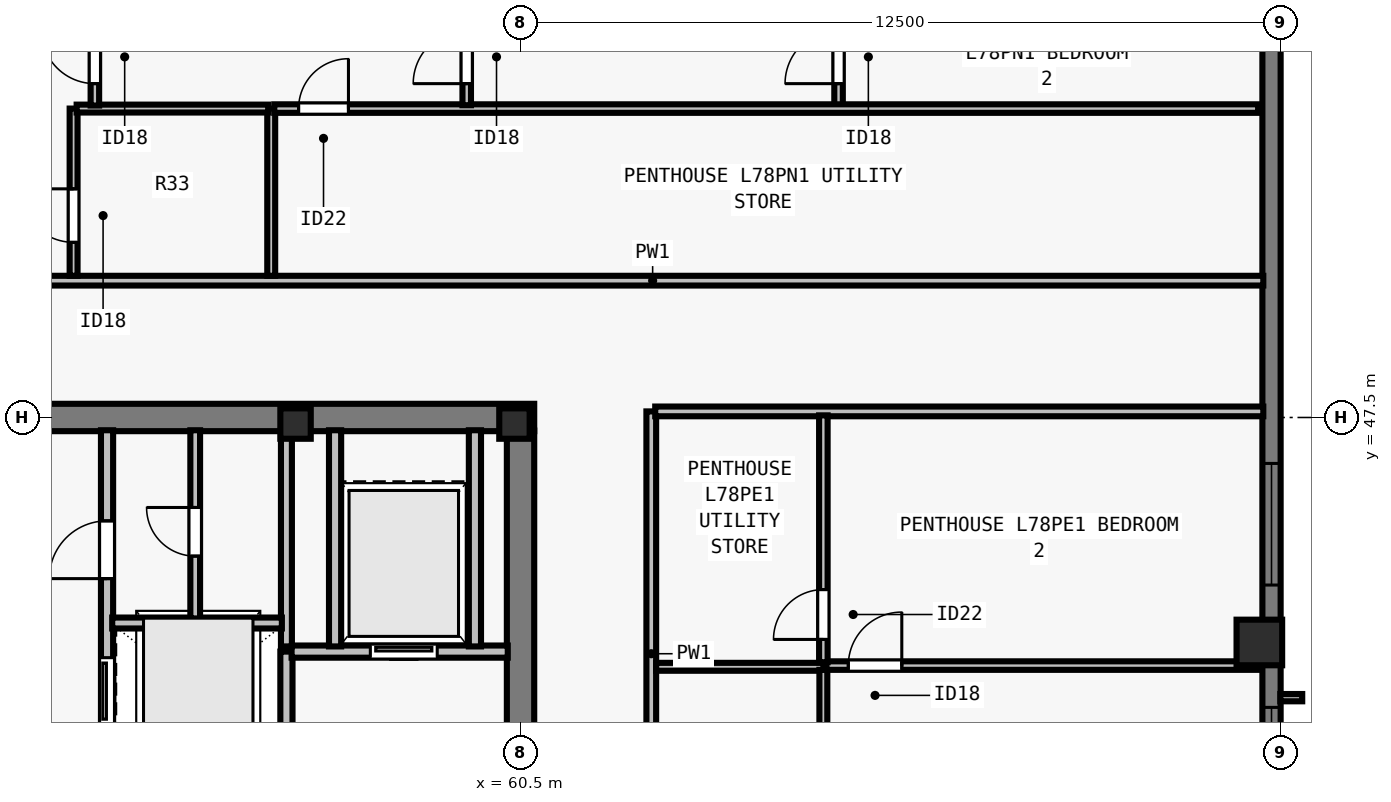
"""IFC4 building model, lengths in metres.
Left out: names, types, materials, properties, quantities, classifications, styles, units other than length and angle.
Written with IfcOpenShell. Run it as: python <this file> out.ifc"""

import sys

from ifc_helpers import new_model, si_unit, direction, frame, frame_2d, origin, origin_2d, place, context, subcontext, project, spatial, rectangle, i_section, extrude, element, fill, save


model = new_model("IFC4")
c1 = context("Model", 3, precision=1e-05, world=origin(), true_north=direction((0.0, 1.0)))
c2 = subcontext(c1, "Body", "Model", "MODEL_VIEW")
j1 = project(units=[si_unit("LENGTHUNIT", "METRE"), si_unit("PLANEANGLEUNIT", "RADIAN")], contexts=[c1])
p1 = place(None, origin())
s1 = spatial("IfcSite", under=j1, at=p1, CompositionType="ELEMENT")
p2 = place(p1, origin())
s2 = spatial("IfcBuilding", under=s1, at=p2, CompositionType="ELEMENT")
p3 = place(p2, frame((0.0, 0.0, 284.0)))
s3 = spatial("IfcBuildingStorey", under=s2, at=p3, CompositionType="ELEMENT", Elevation=284.0)
for number, where, z_axis, x_axis in (
    (1, (56.8, 47.4, 0.0), (0.0, 0.0, 1.0), (1.0, 0.0, 0.0)),
    (2, (60.4, 47.4, 0.0), (0.0, 0.0, 1.0), (1.0, 0.0, 0.0)),
):
    element("IfcColumn", number, at=place(p3, frame(where, z_axis=z_axis, x_axis=x_axis)), inside=s3, PredefinedType="COLUMN", context=c2, shape_type="SweptSolid", body=[
        extrude(i_section(OverallWidth=0.5, OverallDepth=0.5, WebThickness=0.028, FlangeThickness=0.045, at=origin_2d()), origin(), (0.0, 0.0, 1.0), 3.5),
    ])
p4 = place(p3, frame((72.65, 43.8, 0.0), z_axis=(0.0, 0.0, 1.0), x_axis=(0.0, 1.0, 0.0)))
e3 = element("IfcColumn", 3, at=p4, inside=s3, PredefinedType="COLUMN", context=c2, shape_type="SweptSolid", body=[
    extrude(rectangle(XDim=0.75, YDim=0.75, at=origin_2d()), origin(), (0.0, 0.0, 1.0), 3.5),
])
p5 = place(p3, frame((72.85, 54.5, 0.0), z_axis=(0.0, 0.0, 1.0), x_axis=(0.0, -1.0, 0.0)))
e4 = element("IfcWall", 4, at=p5, inside=s3, PredefinedType="SOLIDWALL", context=c2, shape_type="SweptSolid", body=[
    extrude(rectangle(XDim=30.722, YDim=0.3, at=frame_2d((15.361, 0.0))), origin(), (0.0, 0.0, 1.0), 3.29),
])
p6 = place(p5, frame((7.756, 0.0, 0.8)))
e5 = element("IfcOpeningElement", 5, at=p6, cuts=e4, PredefinedType="OPENING", context=c2, shape_type="SweptSolid", body=[
    extrude(rectangle(XDim=2.0, YDim=1.758, at=frame_2d((1.0, 0.879))), frame((0.0, 0.16, 0.0), z_axis=(0.0, -1.0, 0.0), x_axis=(1.0, 0.0, 0.0)), (0.0, 0.0, 1.0), 0.32),
])
p7 = place(p5, frame((11.768, 0.0, 0.8)))
e6 = element("IfcOpeningElement", 6, at=p7, cuts=e4, PredefinedType="OPENING", context=c2, shape_type="SweptSolid", body=[
    extrude(rectangle(XDim=1.65, YDim=1.758, at=frame_2d((0.825, 0.879))), frame((0.0, 0.16, 0.0), z_axis=(0.0, -1.0, 0.0), x_axis=(1.0, 0.0, 0.0)), (0.0, 0.0, 1.0), 0.32),
])
p8 = place(p5, frame((16.28, 0.0, 0.8)))
e7 = element("IfcOpeningElement", 7, at=p8, cuts=e4, PredefinedType="OPENING", context=c2, shape_type="SweptSolid", body=[
    extrude(rectangle(XDim=2.0, YDim=1.758, at=frame_2d((1.0, 0.879))), frame((0.0, 0.16, 0.0), z_axis=(0.0, -1.0, 0.0), x_axis=(1.0, 0.0, 0.0)), (0.0, 0.0, 1.0), 0.32),
])
p9 = place(p5, frame((21.142, 0.0, 0.8)))
e8 = element("IfcOpeningElement", 8, at=p9, cuts=e4, PredefinedType="OPENING", context=c2, shape_type="SweptSolid", body=[
    extrude(rectangle(XDim=1.65, YDim=1.758, at=frame_2d((0.825, 0.879))), frame((0.0, 0.16, 0.0), z_axis=(0.0, -1.0, 0.0), x_axis=(1.0, 0.0, 0.0)), (0.0, 0.0, 1.0), 0.32),
])
p10 = place(p3, frame((43.275, 47.5, 0.0), z_axis=(0.0, 0.0, 1.0), x_axis=(1.0, 0.0, 0.0)))
e9 = element("IfcWall", 9, at=p10, inside=s3, PredefinedType="SHEAR", context=c2, shape_type="SweptSolid", body=[
    extrude(rectangle(XDim=17.45, YDim=0.45, at=frame_2d((8.725, 0.0))), origin(), (0.0, 0.0, 1.0), 3.29),
])
p11 = place(p3, frame((60.5, 40.8, 0.0), z_axis=(0.0, 0.0, 1.0), x_axis=(0.0, 1.0, 0.0)))
e10 = element("IfcWall", 10, at=p11, inside=s3, PredefinedType="SHEAR", context=c2, shape_type="SweptSolid", body=[
    extrude(rectangle(XDim=6.485, YDim=0.45, at=frame_2d((3.242, 0.0))), origin(), (0.0, 0.0, 1.0), 3.29),
])
p12 = place(p3, frame((53.7, 40.585, 0.0), z_axis=(0.0, 0.0, 1.0), x_axis=(0.0, 1.0, 0.0)))
e11 = element("IfcWall", 11, at=p12, inside=s3, PredefinedType="SOLIDWALL", context=c2, shape_type="SweptSolid", body=[
    extrude(rectangle(XDim=6.705, YDim=0.2, at=frame_2d((3.353, 0.0))), origin(), (0.0, 0.0, 1.0), 3.29),
])
p13 = place(p12, frame((0.195, 0.0, 0.0)))
e12 = element("IfcOpeningElement", 12, at=p13, cuts=e11, PredefinedType="OPENING", context=c2, shape_type="SweptSolid", body=[
    extrude(rectangle(XDim=0.8, YDim=2.08, at=frame_2d((0.4, 1.04))), frame((0.0, 0.11, 0.0), z_axis=(0.0, -1.0, 0.0), x_axis=(1.0, 0.0, 0.0)), (0.0, 0.0, 1.0), 0.22),
])
p14 = place(p12, frame((1.865, 0.0, 0.0)))
e13 = element("IfcOpeningElement", 13, at=p14, cuts=e11, PredefinedType="OPENING", context=c2, shape_type="SweptSolid", body=[
    extrude(rectangle(XDim=1.1, YDim=2.2, at=frame_2d((0.55, 1.1))), frame((0.0, 0.11, 0.0), z_axis=(0.0, -1.0, 0.0), x_axis=(1.0, 0.0, 0.0)), (0.0, 0.0, 1.0), 0.22),
])
p15 = place(p12, frame((4.265, 0.0, 0.0)))
e14 = element("IfcOpeningElement", 14, at=p15, cuts=e11, PredefinedType="OPENING", context=c2, shape_type="SweptSolid", body=[
    extrude(rectangle(XDim=0.95, YDim=2.12, at=frame_2d((0.475, 1.06))), frame((0.0, 0.11, 0.0), z_axis=(0.0, -1.0, 0.0), x_axis=(1.0, 0.0, 0.0)), (0.0, 0.0, 1.0), 0.22),
])
p16 = place(p3, frame((56.65, 38.785, 0.0), z_axis=(0.0, 0.0, 1.0), x_axis=(0.0, 1.0, 0.0)))
e15 = element("IfcWall", 15, at=p16, inside=s3, PredefinedType="SOLIDWALL", context=c2, shape_type="SweptSolid", body=[
    extrude(rectangle(XDim=4.865, YDim=0.2, at=frame_2d((2.433, 0.0))), origin(), (0.0, 0.0, 1.0), 3.29),
])
p17 = place(p16, frame((0.265, 0.0, 0.0)))
e16 = element("IfcOpeningElement", 16, at=p17, cuts=e15, PredefinedType="OPENING", context=c2, shape_type="SweptSolid", body=[
    extrude(rectangle(XDim=1.0, YDim=2.15, at=frame_2d((0.5, 1.075))), frame((0.0, 0.11, 0.0), z_axis=(0.0, -1.0, 0.0), x_axis=(1.0, 0.0, 0.0)), (0.0, 0.0, 1.0), 0.22),
])
p18 = place(p3, frame((56.735, 43.65, 0.0), z_axis=(0.0, 0.0, 1.0), x_axis=(1.0, 0.0, 0.0)))
e17 = element("IfcWall", 17, at=p18, inside=s3, PredefinedType="SOLIDWALL", context=c2, shape_type="SweptSolid", body=[
    extrude(rectangle(XDim=3.555, YDim=0.2, at=frame_2d((1.777, 0.0))), origin(), (0.0, 0.0, 1.0), 3.29),
])
p19 = place(p18, frame((1.295, 0.0, 0.0)))
e18 = element("IfcOpeningElement", 18, at=p19, cuts=e17, PredefinedType="OPENING", context=c2, shape_type="SweptSolid", body=[
    extrude(rectangle(XDim=1.1, YDim=2.2, at=frame_2d((0.55, 1.1))), frame((0.0, 0.11, 0.0), z_axis=(0.0, -1.0, 0.0), x_axis=(1.0, 0.0, 0.0)), (0.0, 0.0, 1.0), 0.22),
])
for number, where, z_axis, x_axis in (
    (19, (57.45, 43.735, 0.0), (0.0, 0.0, 1.0), (0.0, 1.0, 0.0)),
    (20, (59.75, 43.735, 0.0), (0.0, 0.0, 1.0), (0.0, 1.0, 0.0)),
):
    element("IfcWall", number, at=place(p3, frame(where, z_axis=z_axis, x_axis=x_axis)), inside=s3, PredefinedType="SOLIDWALL", context=c2, shape_type="SweptSolid", body=[
        extrude(rectangle(XDim=3.555, YDim=0.2, at=frame_2d((1.777, 0.0))), origin(), (0.0, 0.0, 1.0), 3.29),
    ])
p20 = place(p3, frame((56.65, 43.735, 0.0), z_axis=(0.0, 0.0, 1.0), x_axis=(0.0, 1.0, 0.0)))
e21 = element("IfcWall", 21, at=p20, inside=s3, PredefinedType="SOLIDWALL", context=c2, shape_type="SweptSolid", body=[
    extrude(rectangle(XDim=3.555, YDim=0.18, at=frame_2d((1.777, 0.0))), origin(), (0.0, 0.0, 1.0), 3.29),
])
p21 = place(p3, frame((53.785, 44.12, 0.0), z_axis=(0.0, 0.0, 1.0), x_axis=(1.0, 0.0, 0.0)))
e22 = element("IfcWall", 22, at=p21, inside=s3, PredefinedType="SOLIDWALL", context=c2, shape_type="SweptSolid", body=[
    extrude(rectangle(XDim=2.79, YDim=0.18, at=frame_2d((1.395, 0.0))), origin(), (0.0, 0.0, 1.0), 3.29),
])
p22 = place(p3, frame((55.15, 44.195, 0.0), z_axis=(0.0, 0.0, 1.0), x_axis=(0.0, 1.0, 0.0)))
e23 = element("IfcWall", 23, at=p22, inside=s3, PredefinedType="PARTITIONING", context=c2, shape_type="SweptSolid", body=[
    extrude(rectangle(XDim=3.095, YDim=0.16, at=frame_2d((1.547, 0.0))), origin(), (0.0, 0.0, 1.0), 3.29),
])
p23 = place(p22, frame((1.025, 0.0, 0.0)))
e24 = element("IfcOpeningElement", 24, at=p23, cuts=e23, PredefinedType="OPENING", context=c2, shape_type="SweptSolid", body=[
    extrude(rectangle(XDim=0.8, YDim=2.1, at=frame_2d((0.4, 1.05))), frame((0.0, 0.09, 0.0), z_axis=(0.0, -1.0, 0.0), x_axis=(1.0, 0.0, 0.0)), (0.0, 0.0, 1.0), 0.18),
])
p24 = place(p3, frame((31.285, 49.75, 0.0), z_axis=(0.0, 0.0, 1.0), x_axis=(1.0, 0.0, 0.0)))
e25 = element("IfcWall", 25, at=p24, inside=s3, PredefinedType="PARTITIONING", context=c2, shape_type="SweptSolid", body=[
    extrude(rectangle(XDim=41.43, YDim=0.16, at=frame_2d((20.715, 0.0))), origin(), (0.0, 0.0, 1.0), 3.009),
])
p25 = place(p24, frame((20.235, 0.0, 0.0)))
e26 = element("IfcOpeningElement", 26, at=p25, cuts=e25, PredefinedType="OPENING", context=c2, shape_type="SweptSolid", body=[
    extrude(rectangle(XDim=0.96, YDim=2.18, at=frame_2d((0.48, 1.09))), frame((0.0, 0.09, 0.0), z_axis=(0.0, -1.0, 0.0), x_axis=(1.0, 0.0, 0.0)), (0.0, 0.0, 1.0), 0.18),
])
p26 = place(p3, frame((62.65, 30.4, 0.0), z_axis=(0.0, 0.0, 1.0), x_axis=(0.0, 1.0, 0.0)))
e27 = element("IfcWall", 27, at=p26, inside=s3, PredefinedType="PARTITIONING", context=c2, shape_type="SweptSolid", body=[
    extrude(rectangle(XDim=17.2, YDim=0.16, at=frame_2d((8.6, 0.0))), origin(), (0.0, 0.0, 1.0), 3.29),
])
p27 = place(p26, frame((8.12, 0.0, 0.0)))
e28 = element("IfcOpeningElement", 28, at=p27, cuts=e27, PredefinedType="OPENING", context=c2, shape_type="SweptSolid", body=[
    extrude(rectangle(XDim=0.96, YDim=2.18, at=frame_2d((0.48, 1.09))), frame((0.0, 0.09, 0.0), z_axis=(0.0, -1.0, 0.0), x_axis=(1.0, 0.0, 0.0)), (0.0, 0.0, 1.0), 0.18),
])
p28 = place(p3, frame((62.715, 47.6, 0.0), z_axis=(0.0, 0.0, 1.0), x_axis=(1.0, 0.0, 0.0)))
e29 = element("IfcWall", 29, at=p28, inside=s3, PredefinedType="PARTITIONING", context=c2, shape_type="SweptSolid", body=[
    extrude(rectangle(XDim=10.0, YDim=0.16, at=frame_2d((5.0, 0.0))), origin(), (0.0, 0.0, 1.0), 3.29),
])
p29 = place(p3, frame((56.4, 49.83, 0.0), z_axis=(0.0, 0.0, 1.0), x_axis=(0.0, 1.0, 0.0)))
e30 = element("IfcWall", 30, at=p29, inside=s3, PredefinedType="PLUMBINGWALL", context=c2, shape_type="SweptSolid", body=[
    extrude(rectangle(XDim=2.75, YDim=0.13, at=frame_2d((1.375, 0.0))), origin(), (0.0, 0.0, 1.0), 3.29),
])
p30 = place(p3, frame((53.15, 49.83, 0.0), z_axis=(0.0, 0.0, 1.0), x_axis=(0.0, 1.0, 0.0)))
e31 = element("IfcWall", 31, at=p30, inside=s3, PredefinedType="PLUMBINGWALL", context=c2, shape_type="SweptSolid", body=[
    extrude(rectangle(XDim=2.75, YDim=0.13, at=frame_2d((1.375, 0.0))), origin(), (0.0, 0.0, 1.0), 3.29),
])
p31 = place(p30, frame((0.55, 0.0, 0.0)))
e32 = element("IfcOpeningElement", 32, at=p31, cuts=e31, PredefinedType="OPENING", context=c2, shape_type="SweptSolid", body=[
    extrude(rectangle(XDim=0.88, YDim=2.1, at=frame_2d((0.44, 1.05))), frame((0.0, 0.075, 0.0), z_axis=(0.0, -1.0, 0.0), x_axis=(1.0, 0.0, 0.0)), (0.0, 0.0, 1.0), 0.15),
])
p32 = place(p3, frame((53.2, 52.58, 0.0), z_axis=(0.0, 0.0, 1.0), x_axis=(1.0, 0.0, 0.0)))
e33 = element("IfcWall", 33, at=p32, inside=s3, PredefinedType="PLUMBINGWALL", context=c2, shape_type="SweptSolid", body=[
    extrude(rectangle(XDim=3.15, YDim=0.13, at=frame_2d((1.575, 0.0))), origin(), (0.0, 0.0, 1.0), 3.29),
])
p33 = place(p3, frame((65.73, 52.54, 0.0), z_axis=(0.0, 0.0, 1.0), x_axis=(0.0, 1.0, 0.0)))
e34 = element("IfcWall", 34, at=p33, inside=s3, PredefinedType="PARTITIONING", context=c2, shape_type="SweptSolid", body=[
    extrude(rectangle(XDim=7.08, YDim=0.14, at=frame_2d((3.54, 0.0))), origin(), (0.0, 0.0, 1.0), 2.653),
])
p34 = place(p33, frame((0.45, 0.0, 0.0)))
e35 = element("IfcOpeningElement", 35, at=p34, cuts=e34, PredefinedType="OPENING", context=c2, shape_type="SweptSolid", body=[
    extrude(rectangle(XDim=0.88, YDim=2.1, at=frame_2d((0.44, 1.05))), frame((0.0, 0.08, 0.0), z_axis=(0.0, -1.0, 0.0), x_axis=(1.0, 0.0, 0.0)), (0.0, 0.0, 1.0), 0.16),
])
p35 = place(p3, frame((56.45, 52.58, 0.0), z_axis=(0.0, 0.0, 1.0), x_axis=(1.0, 0.0, 0.0)))
e36 = element("IfcWall", 36, at=p35, inside=s3, PredefinedType="PARTITIONING", context=c2, shape_type="SweptSolid", body=[
    extrude(rectangle(XDim=16.18, YDim=0.14, at=frame_2d((8.09, 0.0))), origin(), (0.0, 0.0, 1.0), 3.009),
])
p36 = place(p35, frame((0.4, 0.0, 0.0)))
e37 = element("IfcOpeningElement", 37, at=p36, cuts=e36, PredefinedType="OPENING", context=c2, shape_type="SweptSolid", body=[
    extrude(rectangle(XDim=0.82, YDim=2.1, at=frame_2d((0.41, 1.05))), frame((0.0, 0.08, 0.0), z_axis=(0.0, -1.0, 0.0), x_axis=(1.0, 0.0, 0.0)), (0.0, 0.0, 1.0), 0.16),
])
p37 = place(p3, frame((53.5, 52.63, 0.0), z_axis=(0.0, 0.0, 1.0), x_axis=(0.0, 1.0, 0.0)))
e38 = element("IfcWall", 38, at=p37, inside=s3, PredefinedType="PARTITIONING", context=c2, shape_type="SweptSolid", body=[
    extrude(rectangle(XDim=6.99, YDim=0.14, at=frame_2d((3.495, 0.0))), origin(), (0.0, 0.0, 1.0), 3.009),
])
p38 = place(p37, frame((0.36, 0.0, 0.0)))
e39 = element("IfcOpeningElement", 39, at=p38, cuts=e38, PredefinedType="OPENING", context=c2, shape_type="SweptSolid", body=[
    extrude(rectangle(XDim=0.88, YDim=2.1, at=frame_2d((0.44, 1.05))), frame((0.0, 0.08, 0.0), z_axis=(0.0, -1.0, 0.0), x_axis=(1.0, 0.0, 0.0)), (0.0, 0.0, 1.0), 0.16),
])
p39 = place(p3, frame((59.615, 52.635, 0.0), z_axis=(0.0, 0.0, 1.0), x_axis=(0.0, 1.0, 0.0)))
e40 = element("IfcWall", 40, at=p39, inside=s3, PredefinedType="PARTITIONING", context=c2, shape_type="SweptSolid", body=[
    extrude(rectangle(XDim=6.985, YDim=0.14, at=frame_2d((3.493, 0.0))), origin(), (0.0, 0.0, 1.0), 3.29),
])
p40 = place(p39, frame((0.355, 0.0, 0.0)))
e41 = element("IfcOpeningElement", 41, at=p40, cuts=e40, PredefinedType="OPENING", context=c2, shape_type="SweptSolid", body=[
    extrude(rectangle(XDim=0.88, YDim=2.1, at=frame_2d((0.44, 1.05))), frame((0.0, 0.08, 0.0), z_axis=(0.0, -1.0, 0.0), x_axis=(1.0, 0.0, 0.0)), (0.0, 0.0, 1.0), 0.16),
])
p41 = place(p3, frame((62.73, 43.4, 0.0), z_axis=(0.0, 0.0, 1.0), x_axis=(1.0, 0.0, 0.0)))
e42 = element("IfcWall", 42, at=p41, inside=s3, PredefinedType="PLUMBINGWALL", context=c2, shape_type="SweptSolid", body=[
    extrude(rectangle(XDim=2.75, YDim=0.13, at=frame_2d((1.375, 0.0))), origin(), (0.0, 0.0, 1.0), 3.29),
])
p42 = place(p3, frame((65.48, 40.2, 0.0), z_axis=(0.0, 0.0, 1.0), x_axis=(0.0, 1.0, 0.0)))
e43 = element("IfcWall", 43, at=p42, inside=s3, PredefinedType="PLUMBINGWALL", context=c2, shape_type="SweptSolid", body=[
    extrude(rectangle(XDim=3.15, YDim=0.13, at=frame_2d((1.575, 0.0))), origin(), (0.0, 0.0, 1.0), 3.29),
])
p43 = place(p3, frame((65.53, 43.42, 0.0), z_axis=(0.0, 0.0, 1.0), x_axis=(1.0, 0.0, 0.0)))
e44 = element("IfcWall", 44, at=p43, inside=s3, PredefinedType="PARTITIONING", context=c2, shape_type="SweptSolid", body=[
    extrude(rectangle(XDim=7.09, YDim=0.14, at=frame_2d((3.545, 0.0))), origin(), (0.0, 0.0, 1.0), 3.29),
])
p44 = place(p43, frame((0.36, 0.0, 0.0)))
e45 = element("IfcOpeningElement", 45, at=p44, cuts=e44, PredefinedType="OPENING", context=c2, shape_type="SweptSolid", body=[
    extrude(rectangle(XDim=0.88, YDim=2.1, at=frame_2d((0.44, 1.05))), frame((0.0, 0.08, 0.0), z_axis=(0.0, -1.0, 0.0), x_axis=(1.0, 0.0, 0.0)), (0.0, 0.0, 1.0), 0.16),
])
p45 = place(p3, frame((65.48, 43.475, 0.0), z_axis=(0.0, 0.0, 1.0), x_axis=(0.0, 1.0, 0.0)))
e46 = element("IfcWall", 46, at=p45, inside=s3, PredefinedType="PARTITIONING", context=c2, shape_type="SweptSolid", body=[
    extrude(rectangle(XDim=4.06, YDim=0.14, at=frame_2d((2.03, 0.0))), origin(), (0.0, 0.0, 1.0), 3.29),
])
p46 = place(p45, frame((0.375, 0.0, 0.0)))
e47 = element("IfcOpeningElement", 47, at=p46, cuts=e46, PredefinedType="OPENING", context=c2, shape_type="SweptSolid", body=[
    extrude(rectangle(XDim=0.82, YDim=2.1, at=frame_2d((0.41, 1.05))), frame((0.0, 0.08, 0.0), z_axis=(0.0, -1.0, 0.0), x_axis=(1.0, 0.0, 0.0)), (0.0, 0.0, 1.0), 0.16),
])
p47 = place(p6, origin())
e48 = element("IfcWindow", 48, at=p47, inside=s3, PartitioningType="SINGLE_PANEL", PredefinedType="WINDOW", context=c2, shape_type="SweptSolid", body=[
    extrude(rectangle(XDim=2.0, YDim=1.758, at=frame_2d((1.0, 0.879))), frame((0.0, -0.05, 0.0), z_axis=(0.0, -1.0, 0.0), x_axis=(1.0, 0.0, 0.0)), (0.0, 0.0, 1.0), 0.06),
])
fill(e5, e48)
p48 = place(p7, origin())
e49 = element("IfcWindow", 49, at=p48, inside=s3, PartitioningType="SINGLE_PANEL", PredefinedType="WINDOW", context=c2, shape_type="SweptSolid", body=[
    extrude(rectangle(XDim=1.65, YDim=1.758, at=frame_2d((0.825, 0.879))), frame((0.0, -0.05, 0.0), z_axis=(0.0, -1.0, 0.0), x_axis=(1.0, 0.0, 0.0)), (0.0, 0.0, 1.0), 0.06),
])
fill(e6, e49)
p49 = place(p19, origin())
e50 = element("IfcDoor", 50, at=p49, inside=s3, OperationType="SLIDING_TO_LEFT", PredefinedType="DOOR", context=c2, shape_type="SweptSolid", body=[
    extrude(rectangle(XDim=1.1, YDim=2.2, at=frame_2d((0.55, 1.1))), frame((0.0, 0.025, 0.0), z_axis=(0.0, -1.0, 0.0), x_axis=(1.0, 0.0, 0.0)), (0.0, 0.0, 1.0), 0.05),
])
fill(e18, e50)
p50 = place(p14, origin())
e51 = element("IfcDoor", 51, at=p50, inside=s3, OperationType="SLIDING_TO_LEFT", PredefinedType="DOOR", context=c2, shape_type="SweptSolid", body=[
    extrude(rectangle(XDim=1.1, YDim=2.2, at=frame_2d((0.55, 1.1))), frame((0.0, 0.025, 0.0), z_axis=(0.0, -1.0, 0.0), x_axis=(1.0, 0.0, 0.0)), (0.0, 0.0, 1.0), 0.05),
])
fill(e13, e51)
p51 = place(p15, origin())
e52 = element("IfcDoor", 52, at=p51, inside=s3, OperationType="SINGLE_SWING_LEFT", PredefinedType="DOOR", context=c2, shape_type="SweptSolid", body=[
    extrude(rectangle(XDim=0.95, YDim=2.12, at=frame_2d((0.475, 1.06))), frame((0.0, 0.025, 0.0), z_axis=(0.0, -1.0, 0.0), x_axis=(1.0, 0.0, 0.0)), (0.0, 0.0, 1.0), 0.05),
])
fill(e14, e52)
p52 = place(p23, origin())
e53 = element("IfcDoor", 53, at=p52, inside=s3, OperationType="SINGLE_SWING_RIGHT", PredefinedType="DOOR", context=c2, shape_type="SweptSolid", body=[
    extrude(rectangle(XDim=0.8, YDim=2.1, at=frame_2d((0.4, 1.05))), frame((0.0, 0.025, 0.0), z_axis=(0.0, -1.0, 0.0), x_axis=(1.0, 0.0, 0.0)), (0.0, 0.0, 1.0), 0.05),
])
fill(e24, e53)
p53 = place(p31, origin())
e54 = element("IfcDoor", 54, at=p53, inside=s3, OperationType="SINGLE_SWING_RIGHT", PredefinedType="DOOR", context=c2, shape_type="SweptSolid", body=[
    extrude(rectangle(XDim=0.88, YDim=2.1, at=frame_2d((0.44, 1.05))), frame((0.0, 0.025, 0.0), z_axis=(0.0, -1.0, 0.0), x_axis=(1.0, 0.0, 0.0)), (0.0, 0.0, 1.0), 0.05),
])
fill(e32, e54)
p54 = place(p36, origin())
e55 = element("IfcDoor", 55, at=p54, inside=s3, OperationType="SINGLE_SWING_RIGHT", PredefinedType="DOOR", context=c2, shape_type="SweptSolid", body=[
    extrude(rectangle(XDim=0.82, YDim=2.1, at=frame_2d((0.41, 1.05))), frame((0.0, 0.025, 0.0), z_axis=(0.0, -1.0, 0.0), x_axis=(1.0, 0.0, 0.0)), (0.0, 0.0, 1.0), 0.05),
])
fill(e37, e55)
p55 = place(p34, origin())
e56 = element("IfcDoor", 56, at=p55, inside=s3, OperationType="SINGLE_SWING_LEFT", PredefinedType="DOOR", context=c2, shape_type="SweptSolid", body=[
    extrude(rectangle(XDim=0.88, YDim=2.1, at=frame_2d((0.44, 1.05))), frame((0.0, 0.025, 0.0), z_axis=(0.0, -1.0, 0.0), x_axis=(1.0, 0.0, 0.0)), (0.0, 0.0, 1.0), 0.05),
])
fill(e35, e56)
p56 = place(p38, origin())
e57 = element("IfcDoor", 57, at=p56, inside=s3, OperationType="SINGLE_SWING_RIGHT", PredefinedType="DOOR", context=c2, shape_type="SweptSolid", body=[
    extrude(rectangle(XDim=0.88, YDim=2.1, at=frame_2d((0.44, 1.05))), frame((0.0, 0.025, 0.0), z_axis=(0.0, -1.0, 0.0), x_axis=(1.0, 0.0, 0.0)), (0.0, 0.0, 1.0), 0.05),
])
fill(e39, e57)
p57 = place(p40, origin())
e58 = element("IfcDoor", 58, at=p57, inside=s3, OperationType="SINGLE_SWING_LEFT", PredefinedType="DOOR", context=c2, shape_type="SweptSolid", body=[
    extrude(rectangle(XDim=0.88, YDim=2.1, at=frame_2d((0.44, 1.05))), frame((0.0, 0.025, 0.0), z_axis=(0.0, -1.0, 0.0), x_axis=(1.0, 0.0, 0.0)), (0.0, 0.0, 1.0), 0.05),
])
fill(e41, e58)
p58 = place(p46, origin())
e59 = element("IfcDoor", 59, at=p58, inside=s3, OperationType="SINGLE_SWING_LEFT", PredefinedType="DOOR", context=c2, shape_type="SweptSolid", body=[
    extrude(rectangle(XDim=0.82, YDim=2.1, at=frame_2d((0.41, 1.05))), frame((0.0, 0.025, 0.0), z_axis=(0.0, -1.0, 0.0), x_axis=(1.0, 0.0, 0.0)), (0.0, 0.0, 1.0), 0.05),
])
fill(e47, e59)
p59 = place(p44, origin())
e60 = element("IfcDoor", 60, at=p59, inside=s3, OperationType="SINGLE_SWING_RIGHT", PredefinedType="DOOR", context=c2, shape_type="SweptSolid", body=[
    extrude(rectangle(XDim=0.88, YDim=2.1, at=frame_2d((0.44, 1.05))), frame((0.0, 0.025, 0.0), z_axis=(0.0, -1.0, 0.0), x_axis=(1.0, 0.0, 0.0)), (0.0, 0.0, 1.0), 0.05),
])
fill(e45, e60)
save(model, sys.argv[1])
